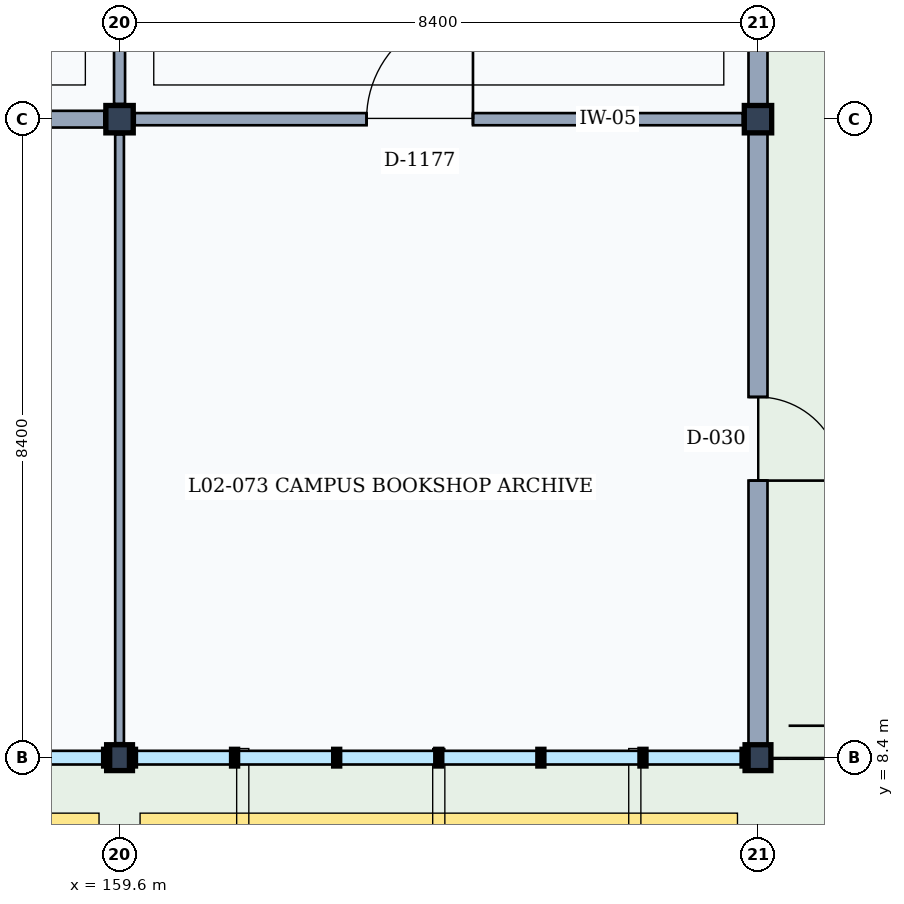
"""IFC4 building model, lengths in metres.
Left out: names, types, materials, properties, quantities, classifications, styles, units other than length and angle.
Written with IfcOpenShell. Run it as: python <this file> out.ifc"""

import sys

from ifc_helpers import new_model, si_unit, direction, frame, frame_2d, origin, origin_2d, place, context, subcontext, project, spatial, rectangle, extrude, element, fill, save


model = new_model("IFC4")
c1 = context("Model", 3, precision=1e-05, world=origin(), true_north=direction((0.0, 1.0)))
c2 = subcontext(c1, "Body", "Model", "MODEL_VIEW")
j1 = project(units=[si_unit("LENGTHUNIT", "METRE"), si_unit("PLANEANGLEUNIT", "RADIAN")], contexts=[c1])
p1 = place(None, origin())
s1 = spatial("IfcSite", under=j1, at=p1, CompositionType="ELEMENT")
p2 = place(p1, origin())
s2 = spatial("IfcBuilding", under=s1, at=p2, CompositionType="ELEMENT")
p3 = place(p2, frame((0.0, 0.0, 9.6)))
s3 = spatial("IfcBuildingStorey", under=s2, at=p3, CompositionType="ELEMENT", Elevation=9.6)
p4 = place(p3, frame((159.6, 8.4, 0.0), z_axis=(0.0, 0.0, 1.0), x_axis=(1.0, 0.0, 0.0)))
e1 = element("IfcColumn", 1, at=p4, inside=s3, PredefinedType="COLUMN", context=c2, shape_type="SweptSolid", body=[
    extrude(rectangle(XDim=0.34, YDim=0.34, at=origin_2d()), origin(), (0.0, 0.0, 1.0), 4.2),
])
p5 = place(p3, frame((159.6, 16.8, 0.0), z_axis=(0.0, 0.0, 1.0), x_axis=(1.0, 0.0, 0.0)))
e2 = element("IfcColumn", 2, at=p5, inside=s3, PredefinedType="COLUMN", context=c2, shape_type="SweptSolid", body=[
    extrude(rectangle(XDim=0.36, YDim=0.36, at=origin_2d()), origin(), (0.0, 0.0, 1.0), 4.2),
])
p6 = place(p3, frame((168.0, 8.4, 0.0), z_axis=(0.0, 0.0, 1.0), x_axis=(1.0, 0.0, 0.0)))
e3 = element("IfcColumn", 3, at=p6, inside=s3, PredefinedType="COLUMN", context=c2, shape_type="SweptSolid", body=[
    extrude(rectangle(XDim=0.34, YDim=0.34, at=origin_2d()), origin(), (0.0, 0.0, 1.0), 4.2),
])
p7 = place(p3, frame((168.0, 16.8, 0.0), z_axis=(0.0, 0.0, 1.0), x_axis=(1.0, 0.0, 0.0)))
e4 = element("IfcColumn", 4, at=p7, inside=s3, PredefinedType="COLUMN", context=c2, shape_type="SweptSolid", body=[
    extrude(rectangle(XDim=0.36, YDim=0.36, at=origin_2d()), origin(), (0.0, 0.0, 1.0), 4.2),
])
p8 = place(p3, frame((168.0, 16.62, 0.0), z_axis=(0.0, 0.0, 1.0), x_axis=(0.0, -1.0, 0.0)))
e5 = element("IfcWall", 5, at=p8, inside=s3, PredefinedType="SOLIDWALL", context=c2, shape_type="SweptSolid", body=[
    extrude(rectangle(XDim=8.05, YDim=0.25, at=frame_2d((4.025, 0.0))), origin(), (0.0, 0.0, 1.0), 3.36),
])
p9 = place(p8, frame((3.475, 0.0, 0.0)))
e6 = element("IfcOpeningElement", 6, at=p9, cuts=e5, PredefinedType="OPENING", context=c2, shape_type="SweptSolid", body=[
    extrude(rectangle(XDim=1.1, YDim=2.2, at=frame_2d((0.55, 1.1))), frame((0.0, 0.135, 0.0), z_axis=(0.0, -1.0, 0.0), x_axis=(1.0, 0.0, 0.0)), (0.0, 0.0, 1.0), 0.27),
])
p10 = place(p3, frame((168.0, 25.03, 0.0), z_axis=(0.0, 0.0, 1.0), x_axis=(0.0, -1.0, 0.0)))
e7 = element("IfcWall", 7, at=p10, inside=s3, PredefinedType="SOLIDWALL", context=c2, shape_type="SweptSolid", body=[
    extrude(rectangle(XDim=8.05, YDim=0.25, at=frame_2d((4.025, 0.0))), origin(), (0.0, 0.0, 1.0), 3.36),
])
p11 = place(p10, frame((3.475, 0.0, 0.0)))
e8 = element("IfcOpeningElement", 8, at=p11, cuts=e7, PredefinedType="OPENING", context=c2, shape_type="SweptSolid", body=[
    extrude(rectangle(XDim=1.1, YDim=2.2, at=frame_2d((0.55, 1.1))), frame((0.0, 0.135, 0.0), z_axis=(0.0, -1.0, 0.0), x_axis=(1.0, 0.0, 0.0)), (0.0, 0.0, 1.0), 0.27),
])
p12 = place(p3, frame((159.6, 8.59, 0.0), z_axis=(0.0, 0.0, 1.0), x_axis=(0.0, 1.0, 0.0)))
e9 = element("IfcWall", 9, at=p12, inside=s3, PredefinedType="PARTITIONING", context=c2, shape_type="SweptSolid", body=[
    extrude(rectangle(XDim=8.01, YDim=0.115, at=frame_2d((4.005, 0.0))), origin(), (0.0, 0.0, 1.0), 3.32),
])
p13 = place(p3, frame((151.4, 16.8, 0.0), z_axis=(0.0, 0.0, 1.0), x_axis=(1.0, 0.0, 0.0)))
e10 = element("IfcWall", 10, at=p13, inside=s3, PredefinedType="PARTITIONING", context=c2, shape_type="SweptSolid", body=[
    extrude(rectangle(XDim=8.0, YDim=0.22, at=frame_2d((4.0, 0.0))), origin(), (0.0, 0.0, 1.0), 3.32),
])
p14 = place(p13, frame((3.125, 0.0, 0.0)))
e11 = element("IfcOpeningElement", 11, at=p14, cuts=e10, PredefinedType="OPENING", context=c2, shape_type="SweptSolid", body=[
    extrude(rectangle(XDim=1.25, YDim=2.3, at=frame_2d((0.625, 1.15))), frame((0.0, 0.12, 0.0), z_axis=(0.0, -1.0, 0.0), x_axis=(1.0, 0.0, 0.0)), (0.0, 0.0, 1.0), 0.24),
])
p15 = place(p3, frame((159.6, 17.0, 0.0), z_axis=(0.0, 0.0, 1.0), x_axis=(0.0, 1.0, 0.0)))
e12 = element("IfcWall", 12, at=p15, inside=s3, PredefinedType="PARTITIONING", context=c2, shape_type="SweptSolid", body=[
    extrude(rectangle(XDim=8.01, YDim=0.145, at=frame_2d((4.005, 0.0))), origin(), (0.0, 0.0, 1.0), 3.32),
])
p16 = place(p15, frame((3.075, 0.0, 0.0)))
e13 = element("IfcOpeningElement", 13, at=p16, cuts=e12, PredefinedType="OPENING", context=c2, shape_type="SweptSolid", body=[
    extrude(rectangle(XDim=1.35, YDim=2.25, at=frame_2d((0.675, 1.125))), frame((0.0, 0.083, 0.0), z_axis=(0.0, -1.0, 0.0), x_axis=(1.0, 0.0, 0.0)), (0.0, 0.0, 1.0), 0.165),
])
p17 = place(p3, frame((159.8, 16.8, 0.0), z_axis=(0.0, 0.0, 1.0), x_axis=(1.0, 0.0, 0.0)))
e14 = element("IfcWall", 14, at=p17, inside=s3, PredefinedType="PARTITIONING", context=c2, shape_type="SweptSolid", body=[
    extrude(rectangle(XDim=8.0, YDim=0.16, at=frame_2d((4.0, 0.0))), origin(), (0.0, 0.0, 1.0), 3.32),
])
p18 = place(p17, frame((3.05, 0.0, 0.0)))
e15 = element("IfcOpeningElement", 15, at=p18, cuts=e14, PredefinedType="OPENING", context=c2, shape_type="SweptSolid", body=[
    extrude(rectangle(XDim=1.4, YDim=2.25, at=frame_2d((0.7, 1.125))), frame((0.0, 0.09, 0.0), z_axis=(0.0, -1.0, 0.0), x_axis=(1.0, 0.0, 0.0)), (0.0, 0.0, 1.0), 0.18),
])
p19 = place(p9, origin())
e16 = element("IfcDoor", 16, at=p19, inside=s3, OperationType="SINGLE_SWING_RIGHT", PredefinedType="DOOR", context=c2, shape_type="SweptSolid", body=[
    extrude(rectangle(XDim=1.1, YDim=2.2, at=frame_2d((0.55, 1.1))), frame((0.0, 0.025, 0.0), z_axis=(0.0, -1.0, 0.0), x_axis=(1.0, 0.0, 0.0)), (0.0, 0.0, 1.0), 0.05),
])
fill(e6, e16)
p20 = place(p18, origin())
e17 = element("IfcDoor", 17, at=p20, inside=s3, OperationType="SINGLE_SWING_RIGHT", PredefinedType="DOOR", context=c2, shape_type="SweptSolid", body=[
    extrude(rectangle(XDim=1.4, YDim=2.25, at=frame_2d((0.7, 1.125))), frame((0.0, 0.025, 0.0), z_axis=(0.0, -1.0, 0.0), x_axis=(1.0, 0.0, 0.0)), (0.0, 0.0, 1.0), 0.05),
])
fill(e15, e17)
save(model, sys.argv[1])
